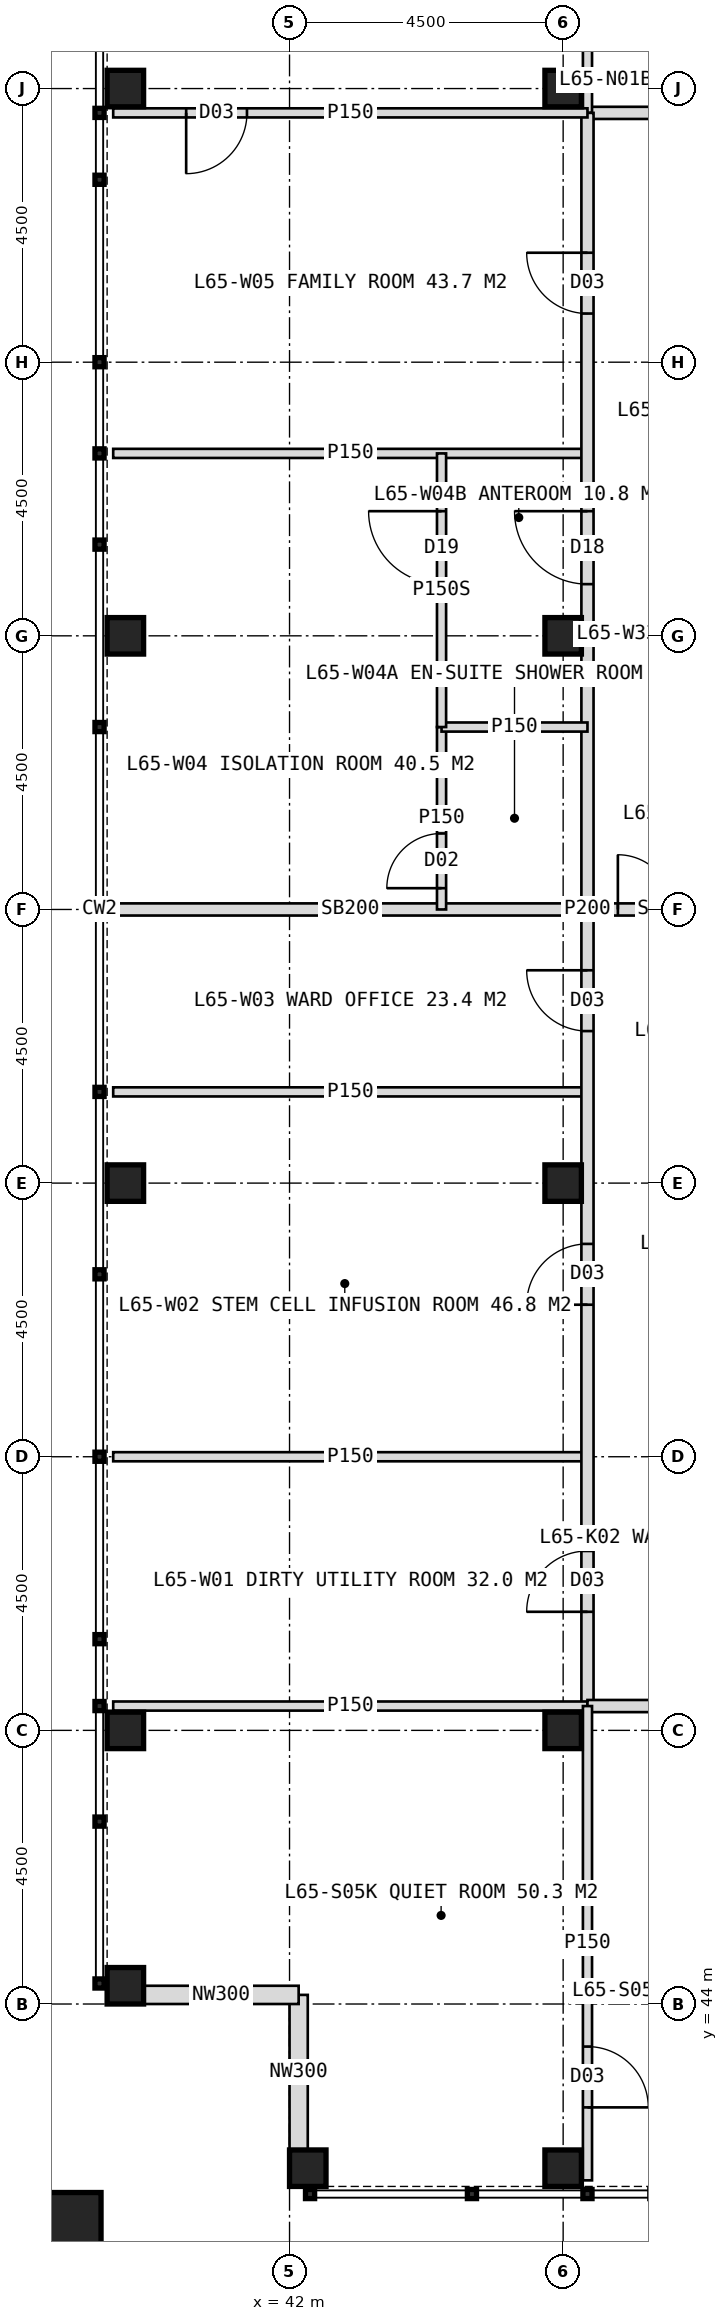
"""IFC4 building model, lengths in metres.
Left out: names, types, materials, properties, quantities, classifications, styles, units other than length and angle.
Written with IfcOpenShell. Run it as: python <this file> out.ifc"""

import sys

from ifc_helpers import new_model, si_unit, direction, frame, frame_2d, origin, origin_2d, place, context, subcontext, project, spatial, rectangle, hollow_rectangle, extrude, element, fill, save


model = new_model("IFC4")
c1 = context("Model", 3, precision=1e-05, world=origin(), true_north=direction((0.0, 1.0)))
c2 = subcontext(c1, "Body", "Model", "MODEL_VIEW")
j1 = project(units=[si_unit("LENGTHUNIT", "METRE"), si_unit("PLANEANGLEUNIT", "RADIAN")], contexts=[c1])
p1 = place(None, origin())
s1 = spatial("IfcSite", under=j1, at=p1, CompositionType="ELEMENT")
p2 = place(p1, origin())
s2 = spatial("IfcBuilding", under=s1, at=p2, CompositionType="ELEMENT")
p3 = place(p2, frame((0.0, 0.0, 270.0)))
s3 = spatial("IfcBuildingStorey", under=s2, at=p3, CompositionType="ELEMENT", Elevation=270.0)
for number, where, z_axis, x_axis in (
    (1, (46.5, 48.5, 0.0), (0.0, 0.0, 1.0), (1.0, 0.0, 0.0)),
    (2, (46.5, 75.5, 0.0), (0.0, 0.0, 1.0), (1.0, 0.0, 0.0)),
    (3, (46.5, 57.5, 0.0), (0.0, 0.0, 1.0), (1.0, 0.0, 0.0)),
    (4, (46.5, 66.5, 0.0), (0.0, 0.0, 1.0), (1.0, 0.0, 0.0)),
    (5, (42.3, 41.3, 0.0), (0.0, 0.0, 1.0), (1.0, 0.0, 0.0)),
    (6, (39.3, 44.3, 0.0), (0.0, 0.0, 1.0), (1.0, 0.0, 0.0)),
    (7, (46.5, 41.3, 0.0), (0.0, 0.0, 1.0), (1.0, 0.0, 0.0)),
    (8, (39.3, 48.5, 0.0), (0.0, 0.0, 1.0), (1.0, 0.0, 0.0)),
    (9, (39.3, 57.5, 0.0), (0.0, 0.0, 1.0), (1.0, 0.0, 0.0)),
    (10, (39.3, 66.5, 0.0), (0.0, 0.0, 1.0), (1.0, 0.0, 0.0)),
    (11, (39.3, 75.5, 0.0), (0.0, 0.0, 1.0), (1.0, 0.0, 0.0)),
):
    element("IfcColumn", number, at=place(p3, frame(where, z_axis=z_axis, x_axis=x_axis)), inside=s3, PredefinedType="COLUMN", context=c2, shape_type="SweptSolid", body=[
        extrude(hollow_rectangle(XDim=0.6, YDim=0.6, WallThickness=0.04, at=origin_2d()), origin(), (0.0, 0.0, 1.0), 4.0),
    ])
p4 = place(p3, frame((38.4, 40.4, 0.0), z_axis=(0.0, 0.0, 1.0), x_axis=(1.0, 0.0, 0.0)))
e12 = element("IfcColumn", 12, at=p4, inside=s3, PredefinedType="COLUMN", context=c2, shape_type="SweptSolid", body=[
    extrude(hollow_rectangle(XDim=1.0, YDim=1.0, WallThickness=0.06, at=origin_2d()), origin(), (0.0, 0.0, 1.0), 4.0),
])
for number, where, z_axis, x_axis in (
    (13, (42.15, 41.6, 0.0), (0.0, 0.0, 1.0), (0.0, 1.0, 0.0)),
    (14, (42.15, 44.15, 0.0), (0.0, 0.0, 1.0), (-1.0, 0.0, 0.0)),
):
    element("IfcWall", number, at=place(p3, frame(where, z_axis=z_axis, x_axis=x_axis)), inside=s3, PredefinedType="ELEMENTEDWALL", context=c2, shape_type="SweptSolid", body=[
        extrude(rectangle(XDim=2.55, YDim=0.3, at=frame_2d((1.275, 0.0))), origin(), (0.0, 0.0, 1.0), 2.95),
    ])
p5 = place(p3, frame((46.9, 75.1, 0.0), z_axis=(0.0, 0.0, 1.0), x_axis=(1.0, 0.0, 0.0)))
e15 = element("IfcWall", 15, at=p5, inside=s3, PredefinedType="PARTITIONING", context=c2, shape_type="SweptSolid", body=[
    extrude(rectangle(XDim=26.2, YDim=0.2, at=frame_2d((13.1, 0.0))), origin(), (0.0, 0.0, 1.0), 3.75),
])
p6 = place(p5, frame((1.75, 0.0, 0.0)))
e16 = element("IfcOpeningElement", 16, at=p6, cuts=e15, PredefinedType="OPENING", context=c2, shape_type="SweptSolid", body=[
    extrude(rectangle(XDim=1.2, YDim=2.2, at=frame_2d((0.6, 1.1))), frame((0.0, 0.11, 0.0), z_axis=(0.0, -1.0, 0.0), x_axis=(1.0, 0.0, 0.0)), (0.0, 0.0, 1.0), 0.22),
])
p7 = place(p5, frame((6.75, 0.0, 0.0)))
e17 = element("IfcOpeningElement", 17, at=p7, cuts=e15, PredefinedType="OPENING", context=c2, shape_type="SweptSolid", body=[
    extrude(rectangle(XDim=1.0, YDim=2.1, at=frame_2d((0.5, 1.05))), frame((0.0, 0.11, 0.0), z_axis=(0.0, -1.0, 0.0), x_axis=(1.0, 0.0, 0.0)), (0.0, 0.0, 1.0), 0.22),
])
p8 = place(p5, frame((11.1, 0.0, 0.0)))
e18 = element("IfcOpeningElement", 18, at=p8, cuts=e15, PredefinedType="OPENING", context=c2, shape_type="SweptSolid", body=[
    extrude(rectangle(XDim=1.0, YDim=2.1, at=frame_2d((0.5, 1.05))), frame((0.0, 0.11, 0.0), z_axis=(0.0, -1.0, 0.0), x_axis=(1.0, 0.0, 0.0)), (0.0, 0.0, 1.0), 0.22),
])
p9 = place(p5, frame((14.1, 0.0, 0.0)))
e19 = element("IfcOpeningElement", 19, at=p9, cuts=e15, PredefinedType="OPENING", context=c2, shape_type="SweptSolid", body=[
    extrude(rectangle(XDim=1.0, YDim=2.1, at=frame_2d((0.5, 1.05))), frame((0.0, 0.11, 0.0), z_axis=(0.0, -1.0, 0.0), x_axis=(1.0, 0.0, 0.0)), (0.0, 0.0, 1.0), 0.22),
])
p10 = place(p5, frame((18.45, 0.0, 0.0)))
e20 = element("IfcOpeningElement", 20, at=p10, cuts=e15, PredefinedType="OPENING", context=c2, shape_type="SweptSolid", body=[
    extrude(rectangle(XDim=1.0, YDim=2.1, at=frame_2d((0.5, 1.05))), frame((0.0, 0.11, 0.0), z_axis=(0.0, -1.0, 0.0), x_axis=(1.0, 0.0, 0.0)), (0.0, 0.0, 1.0), 0.22),
])
p11 = place(p5, frame((22.9, 0.0, 0.0)))
e21 = element("IfcOpeningElement", 21, at=p11, cuts=e15, PredefinedType="OPENING", context=c2, shape_type="SweptSolid", body=[
    extrude(rectangle(XDim=1.0, YDim=2.1, at=frame_2d((0.5, 1.05))), frame((0.0, 0.11, 0.0), z_axis=(0.0, -1.0, 0.0), x_axis=(1.0, 0.0, 0.0)), (0.0, 0.0, 1.0), 0.22),
])
for number, where, z_axis, x_axis in (
    (22, (46.9, 75.1, 0.0), (0.0, 0.0, 1.0), (0.0, 1.0, 0.0)),
    (23, (46.9, 53.0, 0.0), (0.0, 0.0, 1.0), (-1.0, 0.0, 0.0)),
    (24, (46.9, 59.0, 0.0), (0.0, 0.0, 1.0), (-1.0, 0.0, 0.0)),
):
    element("IfcWall", number, at=place(p3, frame(where, z_axis=z_axis, x_axis=x_axis)), inside=s3, PredefinedType="PARTITIONING", context=c2, shape_type="SweptSolid", body=[
        extrude(rectangle(XDim=7.8, YDim=0.15, at=frame_2d((3.9, 0.0))), origin(), (0.0, 0.0, 1.0), 3.75),
    ])
p12 = place(p3, frame((46.9, 62.0, 0.0), z_axis=(0.0, 0.0, 1.0), x_axis=(-1.0, 0.0, 0.0)))
e25 = element("IfcWall", 25, at=p12, inside=s3, PredefinedType="SOLIDWALL", context=c2, shape_type="SweptSolid", body=[
    extrude(rectangle(XDim=7.8, YDim=0.2, at=frame_2d((3.9, 0.0))), origin(), (0.0, 0.0, 1.0), 2.75),
])
p13 = place(p3, frame((46.9, 69.5, 0.0), z_axis=(0.0, 0.0, 1.0), x_axis=(-1.0, 0.0, 0.0)))
e26 = element("IfcWall", 26, at=p13, inside=s3, PredefinedType="PARTITIONING", context=c2, shape_type="SweptSolid", body=[
    extrude(rectangle(XDim=7.8, YDim=0.15, at=frame_2d((3.9, 0.0))), origin(), (0.0, 0.0, 1.0), 3.75),
])
p14 = place(p3, frame((46.9, 48.9, 0.0), z_axis=(0.0, 0.0, 1.0), x_axis=(0.0, 1.0, 0.0)))
e27 = element("IfcWall", 27, at=p14, inside=s3, PredefinedType="PARTITIONING", context=c2, shape_type="SweptSolid", body=[
    extrude(rectangle(XDim=26.2, YDim=0.2, at=frame_2d((13.1, 0.0))), origin(), (0.0, 0.0, 1.0), 3.75),
])
p15 = place(p14, frame((1.55, 0.0, 0.0)))
e28 = element("IfcOpeningElement", 28, at=p15, cuts=e27, PredefinedType="OPENING", context=c2, shape_type="SweptSolid", body=[
    extrude(rectangle(XDim=1.0, YDim=2.1, at=frame_2d((0.5, 1.05))), frame((0.0, 0.11, 0.0), z_axis=(0.0, -1.0, 0.0), x_axis=(1.0, 0.0, 0.0)), (0.0, 0.0, 1.0), 0.22),
])
p16 = place(p14, frame((6.6, 0.0, 0.0)))
e29 = element("IfcOpeningElement", 29, at=p16, cuts=e27, PredefinedType="OPENING", context=c2, shape_type="SweptSolid", body=[
    extrude(rectangle(XDim=1.0, YDim=2.1, at=frame_2d((0.5, 1.05))), frame((0.0, 0.11, 0.0), z_axis=(0.0, -1.0, 0.0), x_axis=(1.0, 0.0, 0.0)), (0.0, 0.0, 1.0), 0.22),
])
p17 = place(p14, frame((11.1, 0.0, 0.0)))
e30 = element("IfcOpeningElement", 30, at=p17, cuts=e27, PredefinedType="OPENING", context=c2, shape_type="SweptSolid", body=[
    extrude(rectangle(XDim=1.0, YDim=2.1, at=frame_2d((0.5, 1.05))), frame((0.0, 0.11, 0.0), z_axis=(0.0, -1.0, 0.0), x_axis=(1.0, 0.0, 0.0)), (0.0, 0.0, 1.0), 0.22),
])
p18 = place(p14, frame((18.45, 0.0, 0.0)))
e31 = element("IfcOpeningElement", 31, at=p18, cuts=e27, PredefinedType="OPENING", context=c2, shape_type="SweptSolid", body=[
    extrude(rectangle(XDim=1.2, YDim=2.2, at=frame_2d((0.6, 1.1))), frame((0.0, 0.11, 0.0), z_axis=(0.0, -1.0, 0.0), x_axis=(1.0, 0.0, 0.0)), (0.0, 0.0, 1.0), 0.22),
])
p19 = place(p14, frame((22.9, 0.0, 0.0)))
e32 = element("IfcOpeningElement", 32, at=p19, cuts=e27, PredefinedType="OPENING", context=c2, shape_type="SweptSolid", body=[
    extrude(rectangle(XDim=1.0, YDim=2.1, at=frame_2d((0.5, 1.05))), frame((0.0, 0.11, 0.0), z_axis=(0.0, -1.0, 0.0), x_axis=(1.0, 0.0, 0.0)), (0.0, 0.0, 1.0), 0.22),
])
p20 = place(p3, frame((46.9, 48.9, 0.0), z_axis=(0.0, 0.0, 1.0), x_axis=(-1.0, 0.0, 0.0)))
e33 = element("IfcWall", 33, at=p20, inside=s3, PredefinedType="PARTITIONING", context=c2, shape_type="SweptSolid", body=[
    extrude(rectangle(XDim=7.8, YDim=0.15, at=frame_2d((3.9, 0.0))), origin(), (0.0, 0.0, 1.0), 3.75),
])
p21 = place(p3, frame((44.5, 62.0, 0.0), z_axis=(0.0, 0.0, 1.0), x_axis=(0.0, 1.0, 0.0)))
e34 = element("IfcWall", 34, at=p21, inside=s3, PredefinedType="PARTITIONING", context=c2, shape_type="SweptSolid", body=[
    extrude(rectangle(XDim=3.0, YDim=0.15, at=frame_2d((1.5, 0.0))), origin(), (0.0, 0.0, 1.0), 3.75),
])
p22 = place(p21, frame((0.35, 0.0, 0.0)))
e35 = element("IfcOpeningElement", 35, at=p22, cuts=e34, PredefinedType="OPENING", context=c2, shape_type="SweptSolid", body=[
    extrude(rectangle(XDim=0.9, YDim=2.1, at=frame_2d((0.45, 1.05))), frame((0.0, 0.085, 0.0), z_axis=(0.0, -1.0, 0.0), x_axis=(1.0, 0.0, 0.0)), (0.0, 0.0, 1.0), 0.17),
])
p23 = place(p3, frame((46.9, 65.0, 0.0), z_axis=(0.0, 0.0, 1.0), x_axis=(-1.0, 0.0, 0.0)))
e36 = element("IfcWall", 36, at=p23, inside=s3, PredefinedType="PARTITIONING", context=c2, shape_type="SweptSolid", body=[
    extrude(rectangle(XDim=2.4, YDim=0.15, at=frame_2d((1.2, 0.0))), origin(), (0.0, 0.0, 1.0), 3.75),
])
p24 = place(p3, frame((44.5, 65.0, 0.0), z_axis=(0.0, 0.0, 1.0), x_axis=(0.0, 1.0, 0.0)))
e37 = element("IfcWall", 37, at=p24, inside=s3, PredefinedType="PARTITIONING", context=c2, shape_type="SweptSolid", body=[
    extrude(rectangle(XDim=4.5, YDim=0.15, at=frame_2d((2.25, 0.0))), origin(), (0.0, 0.0, 1.0), 3.75),
])
p25 = place(p24, frame((2.35, 0.0, 0.0)))
e38 = element("IfcOpeningElement", 38, at=p25, cuts=e37, PredefinedType="OPENING", context=c2, shape_type="SweptSolid", body=[
    extrude(rectangle(XDim=1.2, YDim=2.2, at=frame_2d((0.6, 1.1))), frame((0.0, 0.085, 0.0), z_axis=(0.0, -1.0, 0.0), x_axis=(1.0, 0.0, 0.0)), (0.0, 0.0, 1.0), 0.17),
])
p26 = place(p3, frame((46.9, 75.1, 0.0), z_axis=(0.0, 0.0, 1.0), x_axis=(-1.0, 0.0, 0.0)))
e39 = element("IfcWall", 39, at=p26, inside=s3, PredefinedType="PARTITIONING", context=c2, shape_type="SweptSolid", body=[
    extrude(rectangle(XDim=7.8, YDim=0.15, at=frame_2d((3.9, 0.0))), origin(), (0.0, 0.0, 1.0), 3.75),
])
p27 = place(p26, frame((5.6, 0.0, 0.0)))
e40 = element("IfcOpeningElement", 40, at=p27, cuts=e39, PredefinedType="OPENING", context=c2, shape_type="SweptSolid", body=[
    extrude(rectangle(XDim=1.0, YDim=2.1, at=frame_2d((0.5, 1.05))), frame((0.0, 0.085, 0.0), z_axis=(0.0, -1.0, 0.0), x_axis=(1.0, 0.0, 0.0)), (0.0, 0.0, 1.0), 0.17),
])
p28 = place(p3, frame((73.1, 48.9, 0.0), z_axis=(0.0, 0.0, 1.0), x_axis=(-1.0, 0.0, 0.0)))
e41 = element("IfcWall", 41, at=p28, inside=s3, PredefinedType="PARTITIONING", context=c2, shape_type="SweptSolid", body=[
    extrude(rectangle(XDim=26.2, YDim=0.2, at=frame_2d((13.1, 0.0))), origin(), (0.0, 0.0, 1.0), 3.75),
])
p29 = place(p28, frame((1.75, 0.0, 0.0)))
e42 = element("IfcOpeningElement", 42, at=p29, cuts=e41, PredefinedType="OPENING", context=c2, shape_type="SweptSolid", body=[
    extrude(rectangle(XDim=1.2, YDim=2.2, at=frame_2d((0.6, 1.1))), frame((0.0, 0.11, 0.0), z_axis=(0.0, -1.0, 0.0), x_axis=(1.0, 0.0, 0.0)), (0.0, 0.0, 1.0), 0.22),
])
p30 = place(p28, frame((6.75, 0.0, 0.0)))
e43 = element("IfcOpeningElement", 43, at=p30, cuts=e41, PredefinedType="OPENING", context=c2, shape_type="SweptSolid", body=[
    extrude(rectangle(XDim=1.0, YDim=2.1, at=frame_2d((0.5, 1.05))), frame((0.0, 0.11, 0.0), z_axis=(0.0, -1.0, 0.0), x_axis=(1.0, 0.0, 0.0)), (0.0, 0.0, 1.0), 0.22),
])
p31 = place(p28, frame((12.75, 0.0, 0.0)))
e44 = element("IfcOpeningElement", 44, at=p31, cuts=e41, PredefinedType="OPENING", context=c2, shape_type="SweptSolid", body=[
    extrude(rectangle(XDim=1.2, YDim=2.2, at=frame_2d((0.6, 1.1))), frame((0.0, 0.11, 0.0), z_axis=(0.0, -1.0, 0.0), x_axis=(1.0, 0.0, 0.0)), (0.0, 0.0, 1.0), 0.22),
])
p32 = place(p28, frame((18.45, 0.0, 0.0)))
e45 = element("IfcOpeningElement", 45, at=p32, cuts=e41, PredefinedType="OPENING", context=c2, shape_type="SweptSolid", body=[
    extrude(rectangle(XDim=1.0, YDim=2.1, at=frame_2d((0.5, 1.05))), frame((0.0, 0.11, 0.0), z_axis=(0.0, -1.0, 0.0), x_axis=(1.0, 0.0, 0.0)), (0.0, 0.0, 1.0), 0.22),
])
p33 = place(p28, frame((22.9, 0.0, 0.0)))
e46 = element("IfcOpeningElement", 46, at=p33, cuts=e41, PredefinedType="OPENING", context=c2, shape_type="SweptSolid", body=[
    extrude(rectangle(XDim=1.0, YDim=2.1, at=frame_2d((0.5, 1.05))), frame((0.0, 0.11, 0.0), z_axis=(0.0, -1.0, 0.0), x_axis=(1.0, 0.0, 0.0)), (0.0, 0.0, 1.0), 0.22),
])
p34 = place(p3, frame((46.9, 48.9, 0.0), z_axis=(0.0, 0.0, 1.0), x_axis=(0.0, -1.0, 0.0)))
e47 = element("IfcWall", 47, at=p34, inside=s3, PredefinedType="PARTITIONING", context=c2, shape_type="SweptSolid", body=[
    extrude(rectangle(XDim=7.8, YDim=0.15, at=frame_2d((3.9, 0.0))), origin(), (0.0, 0.0, 1.0), 3.75),
])
p35 = place(p34, frame((5.6, 0.0, 0.0)))
e48 = element("IfcOpeningElement", 48, at=p35, cuts=e47, PredefinedType="OPENING", context=c2, shape_type="SweptSolid", body=[
    extrude(rectangle(XDim=1.0, YDim=2.1, at=frame_2d((0.5, 1.05))), frame((0.0, 0.085, 0.0), z_axis=(0.0, -1.0, 0.0), x_axis=(1.0, 0.0, 0.0)), (0.0, 0.0, 1.0), 0.17),
])
p36 = place(p3, frame((49.5, 62.0, 0.0), z_axis=(0.0, 0.0, 1.0), x_axis=(-1.0, 0.0, 0.0)))
e49 = element("IfcWall", 49, at=p36, inside=s3, PredefinedType="SOLIDWALL", context=c2, shape_type="SweptSolid", body=[
    extrude(rectangle(XDim=2.6, YDim=0.2, at=frame_2d((1.3, 0.0))), origin(), (0.0, 0.0, 1.0), 2.75),
])
p37 = place(p36, frame((0.3, 0.0, 0.0)))
e50 = element("IfcOpeningElement", 50, at=p37, cuts=e49, PredefinedType="OPENING", context=c2, shape_type="SweptSolid", body=[
    extrude(rectangle(XDim=1.8, YDim=2.2, at=frame_2d((0.9, 1.1))), frame((0.0, 0.11, 0.0), z_axis=(0.0, -1.0, 0.0), x_axis=(1.0, 0.0, 0.0)), (0.0, 0.0, 1.0), 0.22),
])
p38 = place(p15, origin())
e51 = element("IfcDoor", 51, at=p38, inside=s3, OperationType="SINGLE_SWING_LEFT", PredefinedType="DOOR", context=c2, shape_type="SweptSolid", body=[
    extrude(rectangle(XDim=1.0, YDim=2.1, at=frame_2d((0.5, 1.05))), frame((0.0, 0.025, 0.0), z_axis=(0.0, -1.0, 0.0), x_axis=(1.0, 0.0, 0.0)), (0.0, 0.0, 1.0), 0.05),
])
fill(e28, e51)
p39 = place(p16, origin())
e52 = element("IfcDoor", 52, at=p39, inside=s3, OperationType="SINGLE_SWING_LEFT", PredefinedType="DOOR", context=c2, shape_type="SweptSolid", body=[
    extrude(rectangle(XDim=1.0, YDim=2.1, at=frame_2d((0.5, 1.05))), frame((0.0, 0.025, 0.0), z_axis=(0.0, -1.0, 0.0), x_axis=(1.0, 0.0, 0.0)), (0.0, 0.0, 1.0), 0.05),
])
fill(e29, e52)
p40 = place(p17, origin())
e53 = element("IfcDoor", 53, at=p40, inside=s3, OperationType="SINGLE_SWING_RIGHT", PredefinedType="DOOR", context=c2, shape_type="SweptSolid", body=[
    extrude(rectangle(XDim=1.0, YDim=2.1, at=frame_2d((0.5, 1.05))), frame((0.0, 0.025, 0.0), z_axis=(0.0, -1.0, 0.0), x_axis=(1.0, 0.0, 0.0)), (0.0, 0.0, 1.0), 0.05),
])
fill(e30, e53)
p41 = place(p25, origin())
e54 = element("IfcDoor", 54, at=p41, inside=s3, OperationType="SINGLE_SWING_RIGHT", PredefinedType="DOOR", context=c2, shape_type="SweptSolid", body=[
    extrude(rectangle(XDim=1.2, YDim=2.2, at=frame_2d((0.6, 1.1))), frame((0.0, 0.025, 0.0), z_axis=(0.0, -1.0, 0.0), x_axis=(1.0, 0.0, 0.0)), (0.0, 0.0, 1.0), 0.05),
])
fill(e38, e54)
p42 = place(p18, origin())
e55 = element("IfcDoor", 55, at=p42, inside=s3, OperationType="SINGLE_SWING_RIGHT", PredefinedType="DOOR", context=c2, shape_type="SweptSolid", body=[
    extrude(rectangle(XDim=1.2, YDim=2.2, at=frame_2d((0.6, 1.1))), frame((0.0, 0.025, 0.0), z_axis=(0.0, -1.0, 0.0), x_axis=(1.0, 0.0, 0.0)), (0.0, 0.0, 1.0), 0.05),
])
fill(e31, e55)
p43 = place(p22, origin())
e56 = element("IfcDoor", 56, at=p43, inside=s3, OperationType="SINGLE_SWING_LEFT", PredefinedType="DOOR", context=c2, shape_type="SweptSolid", body=[
    extrude(rectangle(XDim=0.9, YDim=2.1, at=frame_2d((0.45, 1.05))), frame((0.0, 0.025, 0.0), z_axis=(0.0, -1.0, 0.0), x_axis=(1.0, 0.0, 0.0)), (0.0, 0.0, 1.0), 0.05),
])
fill(e35, e56)
p44 = place(p27, origin())
e57 = element("IfcDoor", 57, at=p44, inside=s3, OperationType="SINGLE_SWING_RIGHT", PredefinedType="DOOR", context=c2, shape_type="SweptSolid", body=[
    extrude(rectangle(XDim=1.0, YDim=2.1, at=frame_2d((0.5, 1.05))), frame((0.0, 0.025, 0.0), z_axis=(0.0, -1.0, 0.0), x_axis=(1.0, 0.0, 0.0)), (0.0, 0.0, 1.0), 0.05),
])
fill(e40, e57)
p45 = place(p19, origin())
e58 = element("IfcDoor", 58, at=p45, inside=s3, OperationType="SINGLE_SWING_RIGHT", PredefinedType="DOOR", context=c2, shape_type="SweptSolid", body=[
    extrude(rectangle(XDim=1.0, YDim=2.1, at=frame_2d((0.5, 1.05))), frame((0.0, 0.025, 0.0), z_axis=(0.0, -1.0, 0.0), x_axis=(1.0, 0.0, 0.0)), (0.0, 0.0, 1.0), 0.05),
])
fill(e32, e58)
p46 = place(p35, origin())
e59 = element("IfcDoor", 59, at=p46, inside=s3, OperationType="SINGLE_SWING_RIGHT", PredefinedType="DOOR", context=c2, shape_type="SweptSolid", body=[
    extrude(rectangle(XDim=1.0, YDim=2.1, at=frame_2d((0.5, 1.05))), frame((0.0, 0.025, 0.0), z_axis=(0.0, -1.0, 0.0), x_axis=(1.0, 0.0, 0.0)), (0.0, 0.0, 1.0), 0.05),
])
fill(e48, e59)
p47 = place(p37, origin())
e60 = element("IfcDoor", 60, at=p47, inside=s3, OperationType="DOUBLE_DOOR_DOUBLE_SWING", PredefinedType="DOOR", context=c2, shape_type="SweptSolid", body=[
    extrude(rectangle(XDim=1.8, YDim=2.2, at=frame_2d((0.9, 1.1))), frame((0.0, 0.025, 0.0), z_axis=(0.0, -1.0, 0.0), x_axis=(1.0, 0.0, 0.0)), (0.0, 0.0, 1.0), 0.05),
])
fill(e50, e60)
save(model, sys.argv[1])
